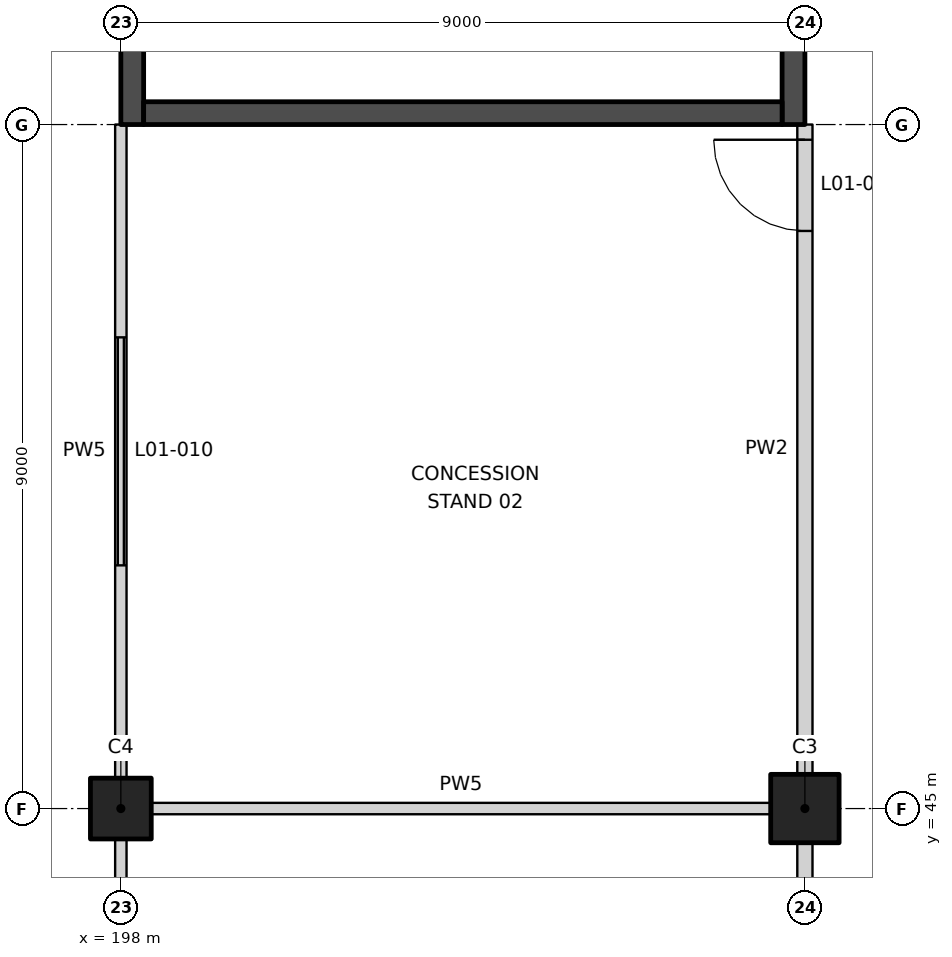
"""IFC4 building model, lengths in metres.
Left out: names, types, materials, properties, quantities, classifications, styles, units other than length and angle.
Written with IfcOpenShell. Run it as: python <this file> out.ifc"""

import sys

from ifc_helpers import new_model, si_unit, direction, frame, frame_2d, origin, origin_2d, place, context, subcontext, project, spatial, rectangle, extrude, element, fill, save


model = new_model("IFC4")
c1 = context("Model", 3, precision=1e-05, world=origin(), true_north=direction((0.0, 1.0)))
c2 = subcontext(c1, "Body", "Model", "MODEL_VIEW")
j1 = project(units=[si_unit("LENGTHUNIT", "METRE"), si_unit("PLANEANGLEUNIT", "RADIAN")], contexts=[c1])
p1 = place(None, origin())
s1 = spatial("IfcSite", under=j1, at=p1, CompositionType="ELEMENT")
p2 = place(p1, origin())
s2 = spatial("IfcBuilding", under=s1, at=p2, CompositionType="ELEMENT")
p3 = place(p2, frame((0.0, 0.0, 7.0)))
s3 = spatial("IfcBuildingStorey", under=s2, at=p3, CompositionType="ELEMENT", Elevation=7.0)
p4 = place(p3, frame((207.0, 45.0, 0.0), z_axis=(0.0, 0.0, 1.0), x_axis=(1.0, 0.0, 0.0)))
e1 = element("IfcColumn", 1, at=p4, inside=s3, PredefinedType="COLUMN", context=c2, shape_type="SweptSolid", body=[
    extrude(rectangle(XDim=0.9, YDim=0.9, at=origin_2d()), origin(), (0.0, 0.0, 1.0), 4.5),
])
p5 = place(p3, frame((198.0, 45.0, 0.0), z_axis=(0.0, 0.0, 1.0), x_axis=(1.0, 0.0, 0.0)))
e2 = element("IfcColumn", 2, at=p5, inside=s3, PredefinedType="COLUMN", context=c2, shape_type="SweptSolid", body=[
    extrude(rectangle(XDim=0.8, YDim=0.8, at=origin_2d()), origin(), (0.0, 0.0, 1.0), 4.5),
])
p6 = place(p3, frame((198.4, 45.0, 0.0), z_axis=(0.0, 0.0, 1.0), x_axis=(1.0, 0.0, 0.0)))
e3 = element("IfcWall", 3, at=p6, inside=s3, PredefinedType="PARTITIONING", context=c2, shape_type="SweptSolid", body=[
    extrude(rectangle(XDim=8.15, YDim=0.15, at=frame_2d((4.075, 0.0))), origin(), (0.0, 0.0, 1.0), 3.25),
])
p7 = place(p3, frame((198.0, 36.4, 0.0), z_axis=(0.0, 0.0, 1.0), x_axis=(0.0, 1.0, 0.0)))
e4 = element("IfcWall", 4, at=p7, inside=s3, PredefinedType="PARTITIONING", context=c2, shape_type="SweptSolid", body=[
    extrude(rectangle(XDim=8.2, YDim=0.15, at=frame_2d((4.1, 0.0))), origin(), (0.0, 0.0, 1.0), 3.25),
])
p8 = place(p7, frame((2.6, 0.0, 0.0)))
e5 = element("IfcOpeningElement", 5, at=p8, cuts=e4, PredefinedType="OPENING", context=c2, shape_type="SweptSolid", body=[
    extrude(rectangle(XDim=3.0, YDim=2.4, at=frame_2d((1.5, 1.2))), frame((0.0, 0.085, 0.0), z_axis=(0.0, -1.0, 0.0), x_axis=(1.0, 0.0, 0.0)), (0.0, 0.0, 1.0), 0.17),
])
p9 = place(p3, frame((198.0, 45.4, 0.0), z_axis=(0.0, 0.0, 1.0), x_axis=(0.0, 1.0, 0.0)))
e6 = element("IfcWall", 6, at=p9, inside=s3, PredefinedType="PARTITIONING", context=c2, shape_type="SweptSolid", body=[
    extrude(rectangle(XDim=8.6, YDim=0.15, at=frame_2d((4.3, 0.0))), origin(), (0.0, 0.0, 1.0), 3.15),
])
p10 = place(p9, frame((2.8, 0.0, 0.0)))
e7 = element("IfcOpeningElement", 7, at=p10, cuts=e6, PredefinedType="OPENING", context=c2, shape_type="SweptSolid", body=[
    extrude(rectangle(XDim=3.0, YDim=2.4, at=frame_2d((1.5, 1.2))), frame((0.0, 0.085, 0.0), z_axis=(0.0, -1.0, 0.0), x_axis=(1.0, 0.0, 0.0)), (0.0, 0.0, 1.0), 0.17),
])
p11 = place(p3, frame((207.0, 36.45, 0.0), z_axis=(0.0, 0.0, 1.0), x_axis=(0.0, 1.0, 0.0)))
e8 = element("IfcWall", 8, at=p11, inside=s3, PredefinedType="PARTITIONING", context=c2, shape_type="SweptSolid", body=[
    extrude(rectangle(XDim=8.1, YDim=0.2, at=frame_2d((4.05, 0.0))), origin(), (0.0, 0.0, 1.0), 3.25),
])
p12 = place(p11, frame((0.2, 0.0, 0.0)))
e9 = element("IfcOpeningElement", 9, at=p12, cuts=e8, PredefinedType="OPENING", context=c2, shape_type="SweptSolid", body=[
    extrude(rectangle(XDim=1.2, YDim=2.1, at=frame_2d((0.6, 1.05))), frame((0.0, 0.11, 0.0), z_axis=(0.0, -1.0, 0.0), x_axis=(1.0, 0.0, 0.0)), (0.0, 0.0, 1.0), 0.22),
])
p13 = place(p3, frame((207.0, 45.45, 0.0), z_axis=(0.0, 0.0, 1.0), x_axis=(0.0, 1.0, 0.0)))
e10 = element("IfcWall", 10, at=p13, inside=s3, PredefinedType="PARTITIONING", context=c2, shape_type="SweptSolid", body=[
    extrude(rectangle(XDim=8.55, YDim=0.2, at=frame_2d((4.275, 0.0))), origin(), (0.0, 0.0, 1.0), 3.25),
])
p14 = place(p13, frame((7.15, 0.0, 0.0)))
e11 = element("IfcOpeningElement", 11, at=p14, cuts=e10, PredefinedType="OPENING", context=c2, shape_type="SweptSolid", body=[
    extrude(rectangle(XDim=1.2, YDim=2.1, at=frame_2d((0.6, 1.05))), frame((0.0, 0.11, 0.0), z_axis=(0.0, -1.0, 0.0), x_axis=(1.0, 0.0, 0.0)), (0.0, 0.0, 1.0), 0.22),
])
p15 = place(p3, frame((198.15, 54.0, 0.0), z_axis=(0.0, 0.0, 1.0), x_axis=(0.0, 1.0, 0.0)))
e12 = element("IfcWall", 12, at=p15, inside=s3, PredefinedType="SHEAR", context=c2, shape_type="SweptSolid", body=[
    extrude(rectangle(XDim=18.0, YDim=0.3, at=frame_2d((9.0, 0.0))), origin(), (0.0, 0.0, 1.0), 4.5),
])
p16 = place(p15, frame((1.5, 0.0, 0.0)))
e13 = element("IfcOpeningElement", 13, at=p16, cuts=e12, PredefinedType="OPENING", context=c2, shape_type="SweptSolid", body=[
    extrude(rectangle(XDim=1.2, YDim=2.1, at=frame_2d((0.6, 1.05))), frame((0.0, 0.16, 0.0), z_axis=(0.0, -1.0, 0.0), x_axis=(1.0, 0.0, 0.0)), (0.0, 0.0, 1.0), 0.32),
])
p17 = place(p3, frame((206.85, 54.0, 0.0), z_axis=(0.0, 0.0, 1.0), x_axis=(0.0, 1.0, 0.0)))
e14 = element("IfcWall", 14, at=p17, inside=s3, PredefinedType="SHEAR", context=c2, shape_type="SweptSolid", body=[
    extrude(rectangle(XDim=18.0, YDim=0.3, at=frame_2d((9.0, 0.0))), origin(), (0.0, 0.0, 1.0), 4.5),
])
p18 = place(p3, frame((198.3, 54.15, 0.0), z_axis=(0.0, 0.0, 1.0), x_axis=(1.0, 0.0, 0.0)))
e15 = element("IfcWall", 15, at=p18, inside=s3, PredefinedType="SHEAR", context=c2, shape_type="SweptSolid", body=[
    extrude(rectangle(XDim=8.4, YDim=0.3, at=frame_2d((4.2, 0.0))), origin(), (0.0, 0.0, 1.0), 4.5),
])
p19 = place(p10, origin())
e16 = element("IfcDoor", 16, at=p19, inside=s3, OperationType="ROLLINGUP", PredefinedType="DOOR", context=c2, shape_type="SweptSolid", body=[
    extrude(rectangle(XDim=3.0, YDim=2.4, at=frame_2d((1.5, 1.2))), frame((0.0, 0.025, 0.0), z_axis=(0.0, -1.0, 0.0), x_axis=(1.0, 0.0, 0.0)), (0.0, 0.0, 1.0), 0.05),
])
fill(e7, e16)
p20 = place(p14, origin())
e17 = element("IfcDoor", 17, at=p20, inside=s3, OperationType="SINGLE_SWING_RIGHT", PredefinedType="DOOR", context=c2, shape_type="SweptSolid", body=[
    extrude(rectangle(XDim=1.2, YDim=2.1, at=frame_2d((0.6, 1.05))), frame((0.0, 0.025, 0.0), z_axis=(0.0, -1.0, 0.0), x_axis=(1.0, 0.0, 0.0)), (0.0, 0.0, 1.0), 0.05),
])
fill(e11, e17)
save(model, sys.argv[1])
